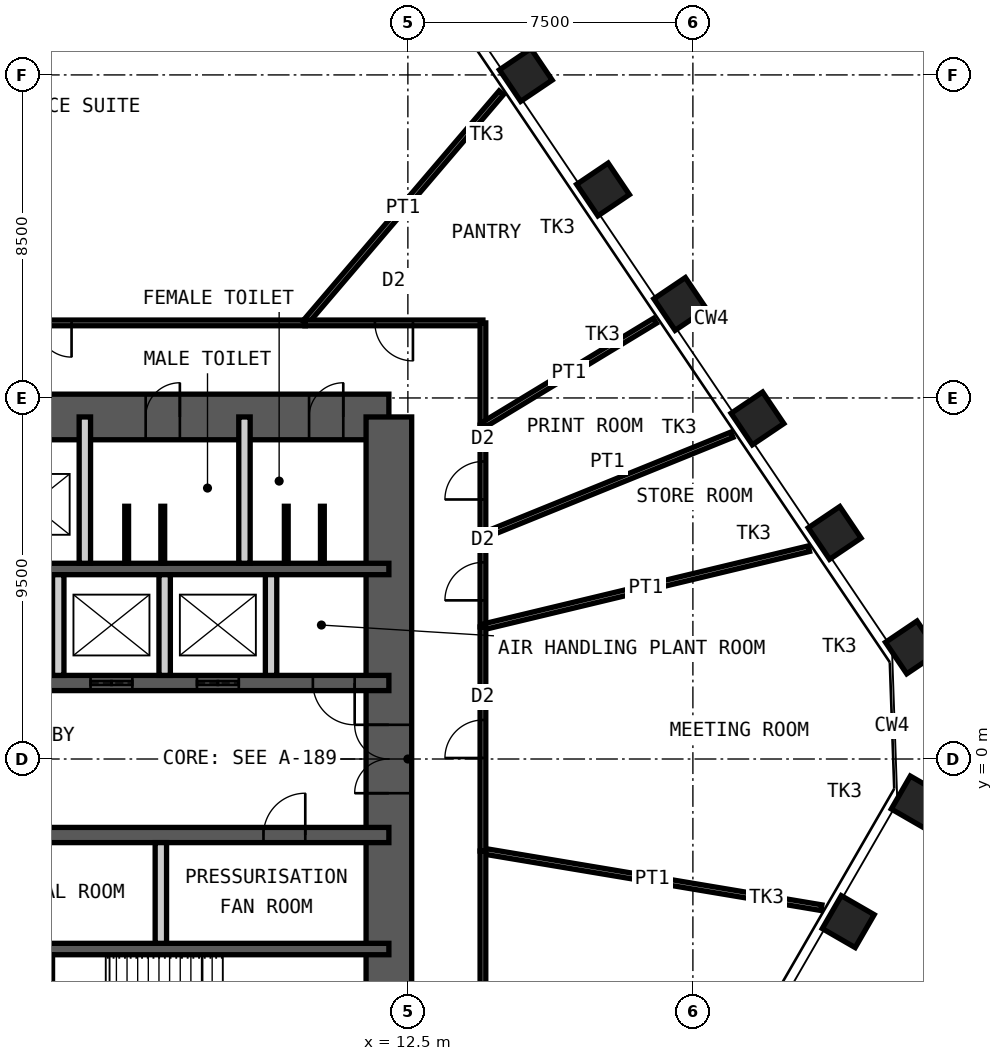
"""IFC4 building model, lengths in metres.
Left out: names, types, materials, properties, quantities, classifications, styles, units other than length and angle.
Written with IfcOpenShell. Run it as: python <this file> out.ifc"""

import sys

from ifc_helpers import new_model, si_unit, direction, frame, frame_2d, origin, origin_2d, place, context, subcontext, project, spatial, rectangle, hollow_rectangle, extrude, element, fill, save


model = new_model("IFC4")
c1 = context("Model", 3, precision=1e-05, world=origin(), true_north=direction((0.0, 1.0)))
c2 = subcontext(c1, "Body", "Model", "MODEL_VIEW")
j1 = project(units=[si_unit("LENGTHUNIT", "METRE"), si_unit("PLANEANGLEUNIT", "RADIAN")], contexts=[c1])
p1 = place(None, origin())
s1 = spatial("IfcSite", under=j1, at=p1, CompositionType="ELEMENT")
p2 = place(p1, origin())
s2 = spatial("IfcBuilding", under=s1, at=p2, CompositionType="ELEMENT")
p3 = place(p2, frame((0.0, 0.0, 251.8)))
s3 = spatial("IfcBuildingStorey", under=s2, at=p3, CompositionType="ELEMENT", Elevation=251.8)
for number, where, z_axis, x_axis in (
    (1, (15.603, 17.998, 0.0), (0.0, 0.0, 1.0), (-0.559, 0.829, 0.0)),
    (2, (17.635, 14.986, 0.0), (0.0, 0.0, 1.0), (-0.559, 0.829, 0.0)),
    (3, (19.667, 11.973, 0.0), (0.0, 0.0, 1.0), (-0.559, 0.829, 0.0)),
    (4, (21.699, 8.961, 0.0), (0.0, 0.0, 1.0), (-0.559, 0.829, 0.0)),
    (5, (23.731, 5.948, 0.0), (0.0, 0.0, 1.0), (-0.559, 0.829, 0.0)),
    (6, (25.762, 2.936, 0.0), (0.0, 0.0, 1.0), (-0.559, 0.829, 0.0)),
    (7, (25.905, -1.132, 0.0), (0.0, 0.0, 1.0), (0.5, 0.866, 0.0)),
    (8, (24.088, -4.279, 0.0), (0.0, 0.0, 1.0), (0.5, 0.866, 0.0)),
):
    element("IfcColumn", number, at=place(p3, frame(where, z_axis=z_axis, x_axis=x_axis)), inside=s3, PredefinedType="COLUMN", context=c2, shape_type="SweptSolid", body=[
        extrude(hollow_rectangle(XDim=1.0, YDim=1.0, WallThickness=0.08, at=origin_2d()), origin(), (0.0, 0.0, 1.0), 4.2),
    ])
p4 = place(p3, frame((-12.0, 9.0, 0.0), z_axis=(0.0, 0.0, 1.0), x_axis=(1.0, 0.0, 0.0)))
e9 = element("IfcWall", 9, at=p4, inside=s3, PredefinedType="SHEAR", context=c2, shape_type="SweptSolid", body=[
    extrude(rectangle(XDim=24.0, YDim=1.2, at=frame_2d((12.0, 0.0))), origin(), (0.0, 0.0, 1.0), 4.2),
])
p5 = place(p4, frame((10.4, 0.0, 0.0)))
e10 = element("IfcOpeningElement", 10, at=p5, cuts=e9, PredefinedType="OPENING", context=c2, shape_type="SweptSolid", body=[
    extrude(rectangle(XDim=1.0, YDim=2.1, at=frame_2d((0.5, 1.05))), frame((0.0, 0.61, 0.0), z_axis=(0.0, -1.0, 0.0), x_axis=(1.0, 0.0, 0.0)), (0.0, 0.0, 1.0), 1.22),
])
p6 = place(p4, frame((17.6, 0.0, 0.0)))
e11 = element("IfcOpeningElement", 11, at=p6, cuts=e9, PredefinedType="OPENING", context=c2, shape_type="SweptSolid", body=[
    extrude(rectangle(XDim=0.9, YDim=2.1, at=frame_2d((0.45, 1.05))), frame((0.0, 0.61, 0.0), z_axis=(0.0, -1.0, 0.0), x_axis=(1.0, 0.0, 0.0)), (0.0, 0.0, 1.0), 1.22),
])
p7 = place(p4, frame((21.9, 0.0, 0.0)))
e12 = element("IfcOpeningElement", 12, at=p7, cuts=e9, PredefinedType="OPENING", context=c2, shape_type="SweptSolid", body=[
    extrude(rectangle(XDim=0.9, YDim=2.1, at=frame_2d((0.45, 1.05))), frame((0.0, 0.61, 0.0), z_axis=(0.0, -1.0, 0.0), x_axis=(1.0, 0.0, 0.0)), (0.0, 0.0, 1.0), 1.22),
])
p8 = place(p3, frame((12.0, -9.0, 0.0), z_axis=(0.0, 0.0, 1.0), x_axis=(0.0, 1.0, 0.0)))
e13 = element("IfcWall", 13, at=p8, inside=s3, PredefinedType="SHEAR", context=c2, shape_type="SweptSolid", body=[
    extrude(rectangle(XDim=18.0, YDim=1.2, at=frame_2d((9.0, 0.0))), origin(), (0.0, 0.0, 1.0), 4.2),
])
p9 = place(p8, frame((8.1, 0.0, 0.0)))
e14 = element("IfcOpeningElement", 14, at=p9, cuts=e13, PredefinedType="OPENING", context=c2, shape_type="SweptSolid", body=[
    extrude(rectangle(XDim=1.8, YDim=2.1, at=frame_2d((0.9, 1.05))), frame((0.0, 0.61, 0.0), z_axis=(0.0, -1.0, 0.0), x_axis=(1.0, 0.0, 0.0)), (0.0, 0.0, 1.0), 1.22),
])
p10 = place(p3, frame((-12.0, 5.0, 0.0), z_axis=(0.0, 0.0, 1.0), x_axis=(1.0, 0.0, 0.0)))
e15 = element("IfcWall", 15, at=p10, inside=s3, PredefinedType="SHEAR", context=c2, shape_type="SweptSolid", body=[
    extrude(rectangle(XDim=24.0, YDim=0.3, at=frame_2d((12.0, 0.0))), origin(), (0.0, 0.0, 1.0), 4.2),
])
p11 = place(p3, frame((-12.0, 2.0, 0.0), z_axis=(0.0, 0.0, 1.0), x_axis=(1.0, 0.0, 0.0)))
e16 = element("IfcWall", 16, at=p11, inside=s3, PredefinedType="SHEAR", context=c2, shape_type="SweptSolid", body=[
    extrude(rectangle(XDim=24.0, YDim=0.4, at=frame_2d((12.0, 0.0))), origin(), (0.0, 0.0, 1.0), 4.2),
])
p12 = place(p11, frame((2.4, 0.0, 0.0)))
e17 = element("IfcOpeningElement", 17, at=p12, cuts=e16, PredefinedType="OPENING", context=c2, shape_type="SweptSolid", body=[
    extrude(rectangle(XDim=1.1, YDim=2.1, at=frame_2d((0.55, 1.05))), frame((0.0, 0.21, 0.0), z_axis=(0.0, -1.0, 0.0), x_axis=(1.0, 0.0, 0.0)), (0.0, 0.0, 1.0), 0.42),
])
p13 = place(p11, frame((22.0, 0.0, 0.0)))
e18 = element("IfcOpeningElement", 18, at=p13, cuts=e16, PredefinedType="OPENING", context=c2, shape_type="SweptSolid", body=[
    extrude(rectangle(XDim=1.1, YDim=2.1, at=frame_2d((0.55, 1.05))), frame((0.0, 0.21, 0.0), z_axis=(0.0, -1.0, 0.0), x_axis=(1.0, 0.0, 0.0)), (0.0, 0.0, 1.0), 0.42),
])
p14 = place(p11, frame((10.15, 0.0, 0.0)))
e19 = element("IfcOpeningElement", 19, at=p14, cuts=e16, PredefinedType="OPENING", context=c2, shape_type="SweptSolid", body=[
    extrude(rectangle(XDim=1.0, YDim=2.1, at=frame_2d((0.5, 1.05))), frame((0.0, 0.21, 0.0), z_axis=(0.0, -1.0, 0.0), x_axis=(1.0, 0.0, 0.0)), (0.0, 0.0, 1.0), 0.42),
])
p15 = place(p11, frame((6.9, 0.0, 0.0)))
e20 = element("IfcOpeningElement", 20, at=p15, cuts=e16, PredefinedType="OPENING", context=c2, shape_type="SweptSolid", body=[
    extrude(rectangle(XDim=1.0, YDim=2.1, at=frame_2d((0.5, 1.05))), frame((0.0, 0.21, 0.0), z_axis=(0.0, -1.0, 0.0), x_axis=(1.0, 0.0, 0.0)), (0.0, 0.0, 1.0), 0.42),
])
p16 = place(p11, frame((13.35, 0.0, 0.0)))
e21 = element("IfcOpeningElement", 21, at=p16, cuts=e16, PredefinedType="OPENING", context=c2, shape_type="SweptSolid", body=[
    extrude(rectangle(XDim=1.1, YDim=2.4, at=frame_2d((0.55, 1.2))), frame((0.0, 0.21, 0.0), z_axis=(0.0, -1.0, 0.0), x_axis=(1.0, 0.0, 0.0)), (0.0, 0.0, 1.0), 0.42),
])
p17 = place(p11, frame((16.15, 0.0, 0.0)))
e22 = element("IfcOpeningElement", 22, at=p17, cuts=e16, PredefinedType="OPENING", context=c2, shape_type="SweptSolid", body=[
    extrude(rectangle(XDim=1.1, YDim=2.4, at=frame_2d((0.55, 1.2))), frame((0.0, 0.21, 0.0), z_axis=(0.0, -1.0, 0.0), x_axis=(1.0, 0.0, 0.0)), (0.0, 0.0, 1.0), 0.42),
])
p18 = place(p11, frame((18.95, 0.0, 0.0)))
e23 = element("IfcOpeningElement", 23, at=p18, cuts=e16, PredefinedType="OPENING", context=c2, shape_type="SweptSolid", body=[
    extrude(rectangle(XDim=1.1, YDim=2.4, at=frame_2d((0.55, 1.2))), frame((0.0, 0.21, 0.0), z_axis=(0.0, -1.0, 0.0), x_axis=(1.0, 0.0, 0.0)), (0.0, 0.0, 1.0), 0.42),
])
p19 = place(p3, frame((-12.0, -2.0, 0.0), z_axis=(0.0, 0.0, 1.0), x_axis=(1.0, 0.0, 0.0)))
e24 = element("IfcWall", 24, at=p19, inside=s3, PredefinedType="SHEAR", context=c2, shape_type="SweptSolid", body=[
    extrude(rectangle(XDim=24.0, YDim=0.4, at=frame_2d((12.0, 0.0))), origin(), (0.0, 0.0, 1.0), 4.2),
])
p20 = place(p19, frame((1.1, 0.0, 0.0)))
e25 = element("IfcOpeningElement", 25, at=p20, cuts=e24, PredefinedType="OPENING", context=c2, shape_type="SweptSolid", body=[
    extrude(rectangle(XDim=1.1, YDim=2.1, at=frame_2d((0.55, 1.05))), frame((0.0, 0.21, 0.0), z_axis=(0.0, -1.0, 0.0), x_axis=(1.0, 0.0, 0.0)), (0.0, 0.0, 1.0), 0.42),
])
p21 = place(p19, frame((13.55, 0.0, 0.0)))
e26 = element("IfcOpeningElement", 26, at=p21, cuts=e24, PredefinedType="OPENING", context=c2, shape_type="SweptSolid", body=[
    extrude(rectangle(XDim=1.1, YDim=2.1, at=frame_2d((0.55, 1.05))), frame((0.0, 0.21, 0.0), z_axis=(0.0, -1.0, 0.0), x_axis=(1.0, 0.0, 0.0)), (0.0, 0.0, 1.0), 0.42),
])
p22 = place(p19, frame((20.7, 0.0, 0.0)))
e27 = element("IfcOpeningElement", 27, at=p22, cuts=e24, PredefinedType="OPENING", context=c2, shape_type="SweptSolid", body=[
    extrude(rectangle(XDim=1.1, YDim=2.1, at=frame_2d((0.55, 1.05))), frame((0.0, 0.21, 0.0), z_axis=(0.0, -1.0, 0.0), x_axis=(1.0, 0.0, 0.0)), (0.0, 0.0, 1.0), 0.42),
])
p23 = place(p19, frame((4.0, 0.0, 0.0)))
e28 = element("IfcOpeningElement", 28, at=p23, cuts=e24, PredefinedType="OPENING", context=c2, shape_type="SweptSolid", body=[
    extrude(rectangle(XDim=1.0, YDim=2.1, at=frame_2d((0.5, 1.05))), frame((0.0, 0.21, 0.0), z_axis=(0.0, -1.0, 0.0), x_axis=(1.0, 0.0, 0.0)), (0.0, 0.0, 1.0), 0.42),
])
p24 = place(p19, frame((6.8, 0.0, 0.0)))
e29 = element("IfcOpeningElement", 29, at=p24, cuts=e24, PredefinedType="OPENING", context=c2, shape_type="SweptSolid", body=[
    extrude(rectangle(XDim=1.0, YDim=2.1, at=frame_2d((0.5, 1.05))), frame((0.0, 0.21, 0.0), z_axis=(0.0, -1.0, 0.0), x_axis=(1.0, 0.0, 0.0)), (0.0, 0.0, 1.0), 0.42),
])
p25 = place(p3, frame((-12.0, -5.0, 0.0), z_axis=(0.0, 0.0, 1.0), x_axis=(1.0, 0.0, 0.0)))
e30 = element("IfcWall", 30, at=p25, inside=s3, PredefinedType="SHEAR", context=c2, shape_type="SweptSolid", body=[
    extrude(rectangle(XDim=24.0, YDim=0.3, at=frame_2d((12.0, 0.0))), origin(), (0.0, 0.0, 1.0), 4.2),
])
for number, where, z_axis, x_axis in (
    (31, (4.0, 5.15, 0.0), (0.0, 0.0, 1.0), (0.0, 1.0, 0.0)),
    (32, (8.2, 5.15, 0.0), (0.0, 0.0, 1.0), (0.0, 1.0, 0.0)),
):
    element("IfcWall", number, at=place(p3, frame(where, z_axis=z_axis, x_axis=x_axis)), inside=s3, PredefinedType="PARTITIONING", context=c2, shape_type="SweptSolid", body=[
        extrude(rectangle(XDim=3.85, YDim=0.3, at=frame_2d((1.925, 0.0))), origin(), (0.0, 0.0, 1.0), 3.98),
    ])
for number, where, z_axis, x_axis in (
    (33, (3.3, 2.2, 0.0), (0.0, 0.0, 1.0), (0.0, 1.0, 0.0)),
    (34, (6.1, 2.2, 0.0), (0.0, 0.0, 1.0), (0.0, 1.0, 0.0)),
    (35, (8.9, 2.2, 0.0), (0.0, 0.0, 1.0), (0.0, 1.0, 0.0)),
    (36, (6.0, -4.85, 0.0), (0.0, 0.0, 1.0), (0.0, 1.0, 0.0)),
):
    element("IfcWall", number, at=place(p3, frame(where, z_axis=z_axis, x_axis=x_axis)), inside=s3, PredefinedType="PARTITIONING", context=c2, shape_type="SweptSolid", body=[
        extrude(rectangle(XDim=2.65, YDim=0.3, at=frame_2d((1.325, 0.0))), origin(), (0.0, 0.0, 1.0), 3.98),
    ])
p26 = place(p3, frame((3.0, -9.0, 0.0), z_axis=(0.0, 0.0, 1.0), x_axis=(0.0, 1.0, 0.0)))
e37 = element("IfcWall", 37, at=p26, inside=s3, PredefinedType="PARTITIONING", context=c2, shape_type="SweptSolid", body=[
    extrude(rectangle(XDim=3.85, YDim=0.3, at=frame_2d((1.925, 0.0))), origin(), (0.0, 0.0, 1.0), 3.98),
])
p27 = place(p26, frame((1.425, 0.0, 0.0)))
e38 = element("IfcOpeningElement", 38, at=p27, cuts=e37, PredefinedType="OPENING", context=c2, shape_type="SweptSolid", body=[
    extrude(rectangle(XDim=1.0, YDim=2.1, at=frame_2d((0.5, 1.05))), frame((0.0, 0.16, 0.0), z_axis=(0.0, -1.0, 0.0), x_axis=(1.0, 0.0, 0.0)), (0.0, 0.0, 1.0), 0.32),
])
for number, where, z_axis, x_axis in (
    (39, (5.1, 5.15, 0.0), (0.0, 0.0, 1.0), (0.0, 1.0, 0.0)),
    (40, (6.05, 5.15, 0.0), (0.0, 0.0, 1.0), (0.0, 1.0, 0.0)),
    (41, (9.3, 5.15, 0.0), (0.0, 0.0, 1.0), (0.0, 1.0, 0.0)),
    (42, (10.25, 5.15, 0.0), (0.0, 0.0, 1.0), (0.0, 1.0, 0.0)),
):
    element("IfcWall", number, at=place(p3, frame(where, z_axis=z_axis, x_axis=x_axis)), inside=s3, PredefinedType="PARTITIONING", context=c2, shape_type="SweptSolid", body=[
        extrude(rectangle(XDim=1.5, YDim=0.1, at=frame_2d((0.75, 0.0))), origin(), (0.0, 0.0, 1.0), 2.1),
    ])
p28 = place(p3, frame((23.383, -3.912, 0.0), z_axis=(0.0, 0.0, 1.0), x_axis=(-0.986293651891, 0.164999491631, 0.0)))
e43 = element("IfcWall", 43, at=p28, inside=s3, PredefinedType="PARTITIONING", context=c2, shape_type="SweptSolid", body=[
    extrude(rectangle(XDim=9.032, YDim=0.15, at=frame_2d((4.516, 0.0))), origin(), (0.0, 0.0, 1.0), 2.72),
])
p29 = place(p3, frame((14.475, -2.422, 0.0), z_axis=(0.0, 0.0, 1.0), x_axis=(0.0, -1.0, 0.0)))
e44 = element("IfcWall", 44, at=p29, inside=s3, PredefinedType="PARTITIONING", context=c2, shape_type="SweptSolid", body=[
    extrude(rectangle(XDim=9.053, YDim=0.15, at=frame_2d((4.527, 0.0))), origin(), (0.0, 0.0, 1.0), 3.92),
])
p30 = place(p3, frame((-4.291, 11.475, 0.0), z_axis=(0.0, 0.0, 1.0), x_axis=(1.0, 0.0, 0.0)))
e45 = element("IfcWall", 45, at=p30, inside=s3, PredefinedType="PARTITIONING", context=c2, shape_type="SweptSolid", body=[
    extrude(rectangle(XDim=14.082, YDim=0.15, at=frame_2d((7.041, 0.0))), origin(), (0.0, 0.0, 1.0), 3.92),
])
p31 = place(p30, frame((6.141, 0.0, 0.0)))
e46 = element("IfcOpeningElement", 46, at=p31, cuts=e45, PredefinedType="OPENING", context=c2, shape_type="SweptSolid", body=[
    extrude(rectangle(XDim=1.8, YDim=2.4, at=frame_2d((0.9, 1.2))), frame((0.0, 0.085, 0.0), z_axis=(0.0, -1.0, 0.0), x_axis=(1.0, 0.0, 0.0)), (0.0, 0.0, 1.0), 0.17),
])
p32 = place(p3, frame((14.958, 17.531, 0.0), z_axis=(0.0, 0.0, 1.0), x_axis=(-0.649097500837, -0.760705221756, 0.0)))
e47 = element("IfcWall", 47, at=p32, inside=s3, PredefinedType="PARTITIONING", context=c2, shape_type="SweptSolid", body=[
    extrude(rectangle(XDim=7.96, YDim=0.15, at=frame_2d((3.98, 0.0))), origin(), (0.0, 0.0, 1.0), 2.72),
])
p33 = place(p3, frame((9.791, 11.475, 0.0), z_axis=(0.0, 0.0, 1.0), x_axis=(1.0, 0.0, 0.0)))
e48 = element("IfcWall", 48, at=p33, inside=s3, PredefinedType="PARTITIONING", context=c2, shape_type="SweptSolid", body=[
    extrude(rectangle(XDim=4.684, YDim=0.15, at=frame_2d((2.342, 0.0))), origin(), (0.0, 0.0, 1.0), 3.92),
])
p34 = place(p33, frame((1.842, 0.0, 0.0)))
e49 = element("IfcOpeningElement", 49, at=p34, cuts=e48, PredefinedType="OPENING", context=c2, shape_type="SweptSolid", body=[
    extrude(rectangle(XDim=1.0, YDim=2.4, at=frame_2d((0.5, 1.2))), frame((0.0, 0.085, 0.0), z_axis=(0.0, -1.0, 0.0), x_axis=(1.0, 0.0, 0.0)), (0.0, 0.0, 1.0), 0.17),
])
p35 = place(p3, frame((14.475, 11.475, 0.0), z_axis=(0.0, 0.0, 1.0), x_axis=(0.0, -1.0, 0.0)))
e50 = element("IfcWall", 50, at=p35, inside=s3, PredefinedType="PARTITIONING", context=c2, shape_type="SweptSolid", body=[
    extrude(rectangle(XDim=2.692, YDim=0.15, at=frame_2d((1.346, 0.0))), origin(), (0.0, 0.0, 1.0), 3.92),
])
p36 = place(p3, frame((19.001, 11.53, 0.0), z_axis=(0.0, 0.0, 1.0), x_axis=(-0.854906581035, -0.518781975114, 0.0)))
e51 = element("IfcWall", 51, at=p36, inside=s3, PredefinedType="PARTITIONING", context=c2, shape_type="SweptSolid", body=[
    extrude(rectangle(XDim=5.294, YDim=0.15, at=frame_2d((2.647, 0.0))), origin(), (0.0, 0.0, 1.0), 2.72),
])
p37 = place(p3, frame((14.475, 8.783, 0.0), z_axis=(0.0, 0.0, 1.0), x_axis=(0.0, -1.0, 0.0)))
e52 = element("IfcWall", 52, at=p37, inside=s3, PredefinedType="PARTITIONING", context=c2, shape_type="SweptSolid", body=[
    extrude(rectangle(XDim=2.91, YDim=0.15, at=frame_2d((1.455, 0.0))), origin(), (0.0, 0.0, 1.0), 3.92),
])
p38 = place(p37, frame((0.955, 0.0, 0.0)))
e53 = element("IfcOpeningElement", 53, at=p38, cuts=e52, PredefinedType="OPENING", context=c2, shape_type="SweptSolid", body=[
    extrude(rectangle(XDim=1.0, YDim=2.4, at=frame_2d((0.5, 1.2))), frame((0.0, 0.085, 0.0), z_axis=(0.0, -1.0, 0.0), x_axis=(1.0, 0.0, 0.0)), (0.0, 0.0, 1.0), 0.17),
])
p39 = place(p3, frame((21.026, 8.532, 0.0), z_axis=(0.0, 0.0, 1.0), x_axis=(-0.926617028548, -0.376006492503, 0.0)))
e54 = element("IfcWall", 54, at=p39, inside=s3, PredefinedType="PARTITIONING", context=c2, shape_type="SweptSolid", body=[
    extrude(rectangle(XDim=7.07, YDim=0.15, at=frame_2d((3.535, 0.0))), origin(), (0.0, 0.0, 1.0), 2.72),
])
p40 = place(p3, frame((14.475, 5.874, 0.0), z_axis=(0.0, 0.0, 1.0), x_axis=(0.0, -1.0, 0.0)))
e55 = element("IfcWall", 55, at=p40, inside=s3, PredefinedType="PARTITIONING", context=c2, shape_type="SweptSolid", body=[
    extrude(rectangle(XDim=2.399, YDim=0.15, at=frame_2d((1.2, 0.0))), origin(), (0.0, 0.0, 1.0), 3.92),
])
p41 = place(p40, frame((0.699, 0.0, 0.0)))
e56 = element("IfcOpeningElement", 56, at=p41, cuts=e55, PredefinedType="OPENING", context=c2, shape_type="SweptSolid", body=[
    extrude(rectangle(XDim=1.0, YDim=2.4, at=frame_2d((0.5, 1.2))), frame((0.0, 0.085, 0.0), z_axis=(0.0, -1.0, 0.0), x_axis=(1.0, 0.0, 0.0)), (0.0, 0.0, 1.0), 0.17),
])
p42 = place(p3, frame((23.053, 5.534, 0.0), z_axis=(0.0, 0.0, 1.0), x_axis=(-0.972377252501, -0.233414821335, 0.0)))
e57 = element("IfcWall", 57, at=p42, inside=s3, PredefinedType="PARTITIONING", context=c2, shape_type="SweptSolid", body=[
    extrude(rectangle(XDim=8.822, YDim=0.15, at=frame_2d((4.411, 0.0))), origin(), (0.0, 0.0, 1.0), 2.72),
])
p43 = place(p3, frame((14.475, 3.475, 0.0), z_axis=(0.0, 0.0, 1.0), x_axis=(0.0, -1.0, 0.0)))
e58 = element("IfcWall", 58, at=p43, inside=s3, PredefinedType="PARTITIONING", context=c2, shape_type="SweptSolid", body=[
    extrude(rectangle(XDim=5.896, YDim=0.15, at=frame_2d((2.948, 0.0))), origin(), (0.0, 0.0, 1.0), 3.92),
])
p44 = place(p43, frame((2.448, 0.0, 0.0)))
e59 = element("IfcOpeningElement", 59, at=p44, cuts=e58, PredefinedType="OPENING", context=c2, shape_type="SweptSolid", body=[
    extrude(rectangle(XDim=1.0, YDim=2.4, at=frame_2d((0.5, 1.2))), frame((0.0, 0.085, 0.0), z_axis=(0.0, -1.0, 0.0), x_axis=(1.0, 0.0, 0.0)), (0.0, 0.0, 1.0), 0.17),
])
p45 = place(p6, origin())
e60 = element("IfcDoor", 60, at=p45, inside=s3, OperationType="SINGLE_SWING_LEFT", PredefinedType="DOOR", context=c2, shape_type="SweptSolid", body=[
    extrude(rectangle(XDim=0.9, YDim=2.1, at=frame_2d((0.45, 1.05))), frame((0.0, 0.025, 0.0), z_axis=(0.0, -1.0, 0.0), x_axis=(1.0, 0.0, 0.0)), (0.0, 0.0, 1.0), 0.05),
])
fill(e11, e60)
p46 = place(p7, origin())
e61 = element("IfcDoor", 61, at=p46, inside=s3, OperationType="SINGLE_SWING_LEFT", PredefinedType="DOOR", context=c2, shape_type="SweptSolid", body=[
    extrude(rectangle(XDim=0.9, YDim=2.1, at=frame_2d((0.45, 1.05))), frame((0.0, 0.025, 0.0), z_axis=(0.0, -1.0, 0.0), x_axis=(1.0, 0.0, 0.0)), (0.0, 0.0, 1.0), 0.05),
])
fill(e12, e61)
p47 = place(p13, origin())
e62 = element("IfcDoor", 62, at=p47, inside=s3, OperationType="SINGLE_SWING_RIGHT", PredefinedType="DOOR", context=c2, shape_type="SweptSolid", body=[
    extrude(rectangle(XDim=1.1, YDim=2.1, at=frame_2d((0.55, 1.05))), frame((0.0, 0.025, 0.0), z_axis=(0.0, -1.0, 0.0), x_axis=(1.0, 0.0, 0.0)), (0.0, 0.0, 1.0), 0.05),
])
fill(e18, e62)
p48 = place(p22, origin())
e63 = element("IfcDoor", 63, at=p48, inside=s3, OperationType="SINGLE_SWING_LEFT", PredefinedType="DOOR", context=c2, shape_type="SweptSolid", body=[
    extrude(rectangle(XDim=1.1, YDim=2.1, at=frame_2d((0.55, 1.05))), frame((0.0, 0.025, 0.0), z_axis=(0.0, -1.0, 0.0), x_axis=(1.0, 0.0, 0.0)), (0.0, 0.0, 1.0), 0.05),
])
fill(e27, e63)
p49 = place(p9, origin())
e64 = element("IfcDoor", 64, at=p49, inside=s3, OperationType="DOUBLE_DOOR_DOUBLE_SWING", PredefinedType="DOOR", context=c2, shape_type="SweptSolid", body=[
    extrude(rectangle(XDim=1.8, YDim=2.1, at=frame_2d((0.9, 1.05))), frame((0.0, 0.025, 0.0), z_axis=(0.0, -1.0, 0.0), x_axis=(1.0, 0.0, 0.0)), (0.0, 0.0, 1.0), 0.05),
])
fill(e14, e64)
p50 = place(p17, origin())
e65 = element("IfcDoor", 65, at=p50, inside=s3, OperationType="DOUBLE_DOOR_SLIDING", PredefinedType="DOOR", context=c2, shape_type="SweptSolid", body=[
    extrude(rectangle(XDim=1.1, YDim=2.4, at=frame_2d((0.55, 1.2))), frame((0.0, 0.025, 0.0), z_axis=(0.0, -1.0, 0.0), x_axis=(1.0, 0.0, 0.0)), (0.0, 0.0, 1.0), 0.05),
])
fill(e22, e65)
p51 = place(p18, origin())
e66 = element("IfcDoor", 66, at=p51, inside=s3, OperationType="DOUBLE_DOOR_SLIDING", PredefinedType="DOOR", context=c2, shape_type="SweptSolid", body=[
    extrude(rectangle(XDim=1.1, YDim=2.4, at=frame_2d((0.55, 1.2))), frame((0.0, 0.025, 0.0), z_axis=(0.0, -1.0, 0.0), x_axis=(1.0, 0.0, 0.0)), (0.0, 0.0, 1.0), 0.05),
])
fill(e23, e66)
p52 = place(p31, origin())
e67 = element("IfcDoor", 67, at=p52, inside=s3, OperationType="DOUBLE_DOOR_DOUBLE_SWING", PredefinedType="DOOR", context=c2, shape_type="SweptSolid", body=[
    extrude(rectangle(XDim=1.8, YDim=2.4, at=frame_2d((0.9, 1.2))), frame((0.0, 0.025, 0.0), z_axis=(0.0, -1.0, 0.0), x_axis=(1.0, 0.0, 0.0)), (0.0, 0.0, 1.0), 0.05),
])
fill(e46, e67)
p53 = place(p34, origin())
e68 = element("IfcDoor", 68, at=p53, inside=s3, OperationType="SINGLE_SWING_RIGHT", PredefinedType="DOOR", context=c2, shape_type="SweptSolid", body=[
    extrude(rectangle(XDim=1.0, YDim=2.4, at=frame_2d((0.5, 1.2))), frame((0.0, 0.025, 0.0), z_axis=(0.0, -1.0, 0.0), x_axis=(1.0, 0.0, 0.0)), (0.0, 0.0, 1.0), 0.05),
])
fill(e49, e68)
p54 = place(p38, origin())
e69 = element("IfcDoor", 69, at=p54, inside=s3, OperationType="SINGLE_SWING_RIGHT", PredefinedType="DOOR", context=c2, shape_type="SweptSolid", body=[
    extrude(rectangle(XDim=1.0, YDim=2.4, at=frame_2d((0.5, 1.2))), frame((0.0, 0.025, 0.0), z_axis=(0.0, -1.0, 0.0), x_axis=(1.0, 0.0, 0.0)), (0.0, 0.0, 1.0), 0.05),
])
fill(e53, e69)
p55 = place(p41, origin())
e70 = element("IfcDoor", 70, at=p55, inside=s3, OperationType="SINGLE_SWING_RIGHT", PredefinedType="DOOR", context=c2, shape_type="SweptSolid", body=[
    extrude(rectangle(XDim=1.0, YDim=2.4, at=frame_2d((0.5, 1.2))), frame((0.0, 0.025, 0.0), z_axis=(0.0, -1.0, 0.0), x_axis=(1.0, 0.0, 0.0)), (0.0, 0.0, 1.0), 0.05),
])
fill(e56, e70)
p56 = place(p44, origin())
e71 = element("IfcDoor", 71, at=p56, inside=s3, OperationType="SINGLE_SWING_RIGHT", PredefinedType="DOOR", context=c2, shape_type="SweptSolid", body=[
    extrude(rectangle(XDim=1.0, YDim=2.4, at=frame_2d((0.5, 1.2))), frame((0.0, 0.025, 0.0), z_axis=(0.0, -1.0, 0.0), x_axis=(1.0, 0.0, 0.0)), (0.0, 0.0, 1.0), 0.05),
])
fill(e59, e71)
save(model, sys.argv[1])
